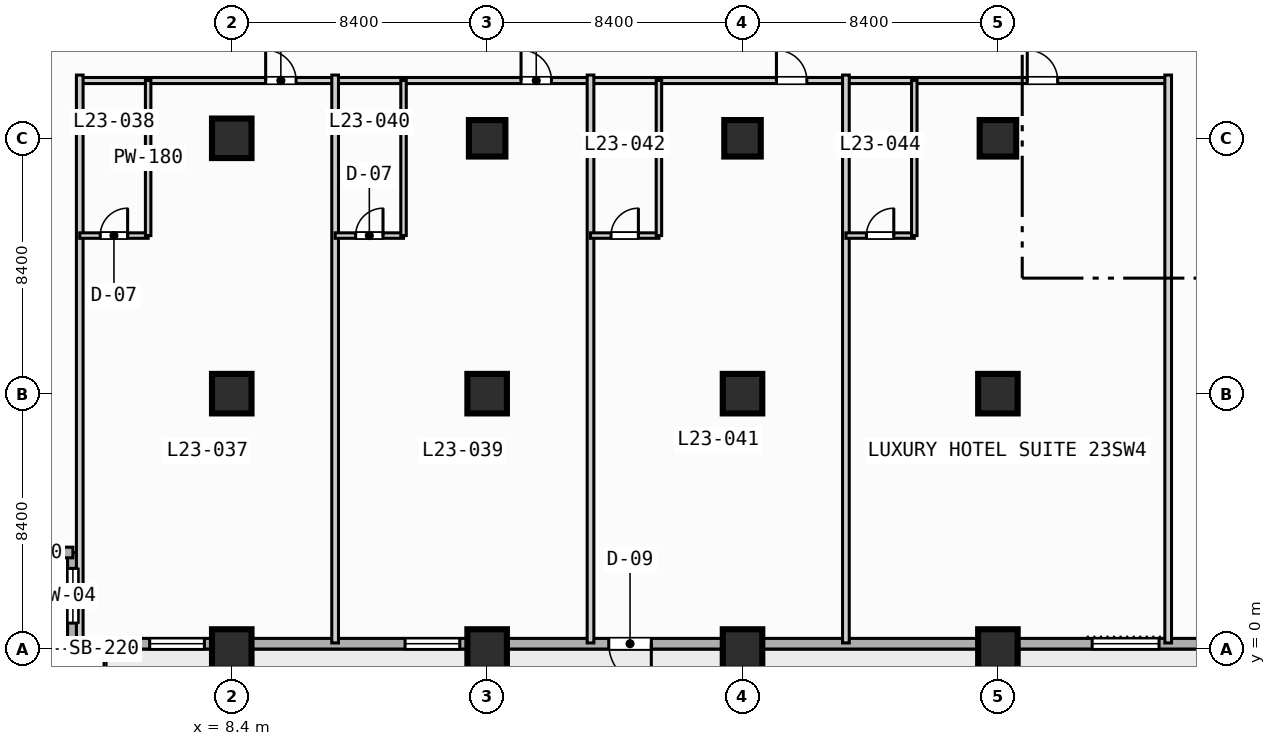
"""IFC4 building model, lengths in metres.
Left out: names, types, materials, properties, quantities, classifications, styles, units other than length and angle.
Written with IfcOpenShell. Run it as: python <this file> out.ifc"""

import sys

from ifc_helpers import new_model, si_unit, direction, frame, frame_2d, origin, origin_2d, place, context, subcontext, project, spatial, rectangle, extrude, element, fill, save


model = new_model("IFC4")
c1 = context("Model", 3, precision=1e-05, world=origin(), true_north=direction((0.0, 1.0)))
c2 = subcontext(c1, "Body", "Model", "MODEL_VIEW")
j1 = project(units=[si_unit("LENGTHUNIT", "METRE"), si_unit("PLANEANGLEUNIT", "RADIAN")], contexts=[c1])
p1 = place(None, origin())
s1 = spatial("IfcSite", under=j1, at=p1, CompositionType="ELEMENT")
p2 = place(p1, origin())
s2 = spatial("IfcBuilding", under=s1, at=p2, CompositionType="ELEMENT")
p3 = place(p2, frame((0.0, 0.0, 100.0)))
s3 = spatial("IfcBuildingStorey", under=s2, at=p3, CompositionType="ELEMENT", Elevation=100.0)
for number, where, z_axis, x_axis in (
    (1, (8.4, 0.0, 0.0), (0.0, 0.0, 1.0), (1.0, 0.0, 0.0)),
    (2, (8.4, 8.4, 0.0), (0.0, 0.0, 1.0), (1.0, 0.0, 0.0)),
    (3, (8.4, 16.8, 0.0), (0.0, 0.0, 1.0), (1.0, 0.0, 0.0)),
    (4, (16.8, 0.0, 0.0), (0.0, 0.0, 1.0), (1.0, 0.0, 0.0)),
    (5, (16.8, 8.4, 0.0), (0.0, 0.0, 1.0), (1.0, 0.0, 0.0)),
):
    element("IfcColumn", number, at=place(p3, frame(where, z_axis=z_axis, x_axis=x_axis)), inside=s3, PredefinedType="COLUMN", context=c2, shape_type="SweptSolid", body=[
        extrude(rectangle(XDim=1.3, YDim=1.3, at=origin_2d()), origin(), (0.0, 0.0, 1.0), 3.8),
    ])
p4 = place(p3, frame((16.8, 16.8, 0.0), z_axis=(0.0, 0.0, 1.0), x_axis=(1.0, 0.0, 0.0)))
e6 = element("IfcColumn", 6, at=p4, inside=s3, PredefinedType="COLUMN", context=c2, shape_type="SweptSolid", body=[
    extrude(rectangle(XDim=1.2, YDim=1.2, at=origin_2d()), origin(), (0.0, 0.0, 1.0), 3.8),
])
for number, where, z_axis, x_axis in (
    (7, (25.2, 0.0, 0.0), (0.0, 0.0, 1.0), (1.0, 0.0, 0.0)),
    (8, (25.2, 8.4, 0.0), (0.0, 0.0, 1.0), (1.0, 0.0, 0.0)),
):
    element("IfcColumn", number, at=place(p3, frame(where, z_axis=z_axis, x_axis=x_axis)), inside=s3, PredefinedType="COLUMN", context=c2, shape_type="SweptSolid", body=[
        extrude(rectangle(XDim=1.3, YDim=1.3, at=origin_2d()), origin(), (0.0, 0.0, 1.0), 3.8),
    ])
p5 = place(p3, frame((25.2, 16.8, 0.0), z_axis=(0.0, 0.0, 1.0), x_axis=(1.0, 0.0, 0.0)))
e9 = element("IfcColumn", 9, at=p5, inside=s3, PredefinedType="COLUMN", context=c2, shape_type="SweptSolid", body=[
    extrude(rectangle(XDim=1.2, YDim=1.2, at=origin_2d()), origin(), (0.0, 0.0, 1.0), 3.8),
])
for number, where, z_axis, x_axis in (
    (10, (33.6, 0.0, 0.0), (0.0, 0.0, 1.0), (1.0, 0.0, 0.0)),
    (11, (33.6, 8.4, 0.0), (0.0, 0.0, 1.0), (1.0, 0.0, 0.0)),
):
    element("IfcColumn", number, at=place(p3, frame(where, z_axis=z_axis, x_axis=x_axis)), inside=s3, PredefinedType="COLUMN", context=c2, shape_type="SweptSolid", body=[
        extrude(rectangle(XDim=1.3, YDim=1.3, at=origin_2d()), origin(), (0.0, 0.0, 1.0), 3.8),
    ])
p6 = place(p3, frame((33.6, 16.8, 0.0), z_axis=(0.0, 0.0, 1.0), x_axis=(1.0, 0.0, 0.0)))
e12 = element("IfcColumn", 12, at=p6, inside=s3, PredefinedType="COLUMN", context=c2, shape_type="SweptSolid", body=[
    extrude(rectangle(XDim=1.2, YDim=1.2, at=origin_2d()), origin(), (0.0, 0.0, 1.0), 3.8),
])
p7 = place(p3, frame((3.175, 0.175, 0.0), z_axis=(0.0, 0.0, 1.0), x_axis=(0.0, 1.0, 0.0)))
e13 = element("IfcWall", 13, at=p7, inside=s3, PredefinedType="STANDARD", context=c2, shape_type="SweptSolid", body=[
    extrude(rectangle(XDim=3.0, YDim=0.35, at=frame_2d((1.5, 0.0))), origin(), (0.0, 0.0, 1.0), 3.55),
])
p8 = place(p7, frame((0.677, 0.0, 0.85)))
e14 = element("IfcOpeningElement", 14, at=p8, cuts=e13, PredefinedType="OPENING", context=c2, shape_type="SweptSolid", body=[
    extrude(rectangle(XDim=1.8, YDim=1.8, at=frame_2d((0.9, 0.9))), frame((0.0, 0.185, 0.0), z_axis=(0.0, -1.0, 0.0), x_axis=(1.0, 0.0, 0.0)), (0.0, 0.0, 1.0), 0.37),
])
p9 = place(p3, frame((3.175, 3.175, 0.0), z_axis=(0.0, 0.0, 1.0), x_axis=(-1.0, 0.0, 0.0)))
e15 = element("IfcWall", 15, at=p9, inside=s3, PredefinedType="STANDARD", context=c2, shape_type="SweptSolid", body=[
    extrude(rectangle(XDim=3.0, YDim=0.35, at=frame_2d((1.5, 0.0))), origin(), (0.0, 0.0, 1.0), 3.55),
])
p10 = place(p3, frame((72.425, 0.175, 0.0), z_axis=(0.0, 0.0, 1.0), x_axis=(-1.0, 0.0, 0.0)))
e16 = element("IfcWall", 16, at=p10, inside=s3, PredefinedType="STANDARD", context=c2, shape_type="SweptSolid", body=[
    extrude(rectangle(XDim=69.25, YDim=0.35, at=frame_2d((34.625, 0.0))), origin(), (0.0, 0.0, 1.0), 3.55),
])
p11 = place(p10, frame((50.225, 0.0, 0.0)))
e17 = element("IfcOpeningElement", 17, at=p11, cuts=e16, PredefinedType="OPENING", context=c2, shape_type="SweptSolid", body=[
    extrude(rectangle(XDim=1.4, YDim=2.2, at=frame_2d((0.7, 1.1))), frame((0.0, 0.185, 0.0), z_axis=(0.0, -1.0, 0.0), x_axis=(1.0, 0.0, 0.0)), (0.0, 0.0, 1.0), 0.37),
])
p12 = place(p10, frame((33.525, 0.0, 0.85)))
e18 = element("IfcOpeningElement", 18, at=p12, cuts=e16, PredefinedType="OPENING", context=c2, shape_type="SweptSolid", body=[
    extrude(rectangle(XDim=2.2, YDim=1.8, at=frame_2d((1.1, 0.9))), frame((0.0, 0.185, 0.0), z_axis=(0.0, -1.0, 0.0), x_axis=(1.0, 0.0, 0.0)), (0.0, 0.0, 1.0), 0.37),
])
p13 = place(p10, frame((25.125, 0.0, 0.85)))
e19 = element("IfcOpeningElement", 19, at=p13, cuts=e16, PredefinedType="OPENING", context=c2, shape_type="SweptSolid", body=[
    extrude(rectangle(XDim=2.2, YDim=1.8, at=frame_2d((1.1, 0.9))), frame((0.0, 0.185, 0.0), z_axis=(0.0, -1.0, 0.0), x_axis=(1.0, 0.0, 0.0)), (0.0, 0.0, 1.0), 0.37),
])
p14 = place(p10, frame((8.325, 0.0, 0.85)))
e20 = element("IfcOpeningElement", 20, at=p14, cuts=e16, PredefinedType="OPENING", context=c2, shape_type="SweptSolid", body=[
    extrude(rectangle(XDim=2.2, YDim=1.8, at=frame_2d((1.1, 0.9))), frame((0.0, 0.185, 0.0), z_axis=(0.0, -1.0, 0.0), x_axis=(1.0, 0.0, 0.0)), (0.0, 0.0, 1.0), 0.37),
])
p15 = place(p10, frame((64.925, 0.0, 0.85)))
e21 = element("IfcOpeningElement", 21, at=p15, cuts=e16, PredefinedType="OPENING", context=c2, shape_type="SweptSolid", body=[
    extrude(rectangle(XDim=1.8, YDim=1.8, at=frame_2d((0.9, 0.9))), frame((0.0, 0.185, 0.0), z_axis=(0.0, -1.0, 0.0), x_axis=(1.0, 0.0, 0.0)), (0.0, 0.0, 1.0), 0.37),
])
p16 = place(p10, frame((56.525, 0.0, 0.85)))
e22 = element("IfcOpeningElement", 22, at=p16, cuts=e16, PredefinedType="OPENING", context=c2, shape_type="SweptSolid", body=[
    extrude(rectangle(XDim=1.8, YDim=1.8, at=frame_2d((0.9, 0.9))), frame((0.0, 0.185, 0.0), z_axis=(0.0, -1.0, 0.0), x_axis=(1.0, 0.0, 0.0)), (0.0, 0.0, 1.0), 0.37),
])
p17 = place(p10, frame((2.125, 0.0, 0.85)))
e23 = element("IfcOpeningElement", 23, at=p17, cuts=e16, PredefinedType="OPENING", context=c2, shape_type="SweptSolid", body=[
    extrude(rectangle(XDim=1.8, YDim=1.8, at=frame_2d((0.9, 0.9))), frame((0.0, 0.185, 0.0), z_axis=(0.0, -1.0, 0.0), x_axis=(1.0, 0.0, 0.0)), (0.0, 0.0, 1.0), 0.37),
])
p18 = place(p3, frame((3.4, 18.7, 0.0), z_axis=(0.0, 0.0, 1.0), x_axis=(1.0, 0.0, 0.0)))
e24 = element("IfcWall", 24, at=p18, inside=s3, PredefinedType="PARTITIONING", context=c2, shape_type="SweptSolid", body=[
    extrude(rectangle(XDim=35.8, YDim=0.2, at=frame_2d((17.9, 0.0))), origin(), (0.0, 0.0, 1.0), 3.55),
])
p19 = place(p18, frame((6.115, 0.0, 0.0)))
e25 = element("IfcOpeningElement", 25, at=p19, cuts=e24, PredefinedType="OPENING", context=c2, shape_type="SweptSolid", body=[
    extrude(rectangle(XDim=1.0, YDim=2.15, at=frame_2d((0.5, 1.075))), frame((0.0, 0.11, 0.0), z_axis=(0.0, -1.0, 0.0), x_axis=(1.0, 0.0, 0.0)), (0.0, 0.0, 1.0), 0.22),
])
p20 = place(p18, frame((14.515, 0.0, 0.0)))
e26 = element("IfcOpeningElement", 26, at=p20, cuts=e24, PredefinedType="OPENING", context=c2, shape_type="SweptSolid", body=[
    extrude(rectangle(XDim=1.0, YDim=2.15, at=frame_2d((0.5, 1.075))), frame((0.0, 0.11, 0.0), z_axis=(0.0, -1.0, 0.0), x_axis=(1.0, 0.0, 0.0)), (0.0, 0.0, 1.0), 0.22),
])
p21 = place(p18, frame((22.915, 0.0, 0.0)))
e27 = element("IfcOpeningElement", 27, at=p21, cuts=e24, PredefinedType="OPENING", context=c2, shape_type="SweptSolid", body=[
    extrude(rectangle(XDim=1.0, YDim=2.15, at=frame_2d((0.5, 1.075))), frame((0.0, 0.11, 0.0), z_axis=(0.0, -1.0, 0.0), x_axis=(1.0, 0.0, 0.0)), (0.0, 0.0, 1.0), 0.22),
])
p22 = place(p18, frame((31.165, 0.0, 0.0)))
e28 = element("IfcOpeningElement", 28, at=p22, cuts=e24, PredefinedType="OPENING", context=c2, shape_type="SweptSolid", body=[
    extrude(rectangle(XDim=1.0, YDim=2.15, at=frame_2d((0.5, 1.075))), frame((0.0, 0.11, 0.0), z_axis=(0.0, -1.0, 0.0), x_axis=(1.0, 0.0, 0.0)), (0.0, 0.0, 1.0), 0.22),
])
p23 = place(p3, frame((3.4, 0.2, 0.0), z_axis=(0.0, 0.0, 1.0), x_axis=(0.0, 1.0, 0.0)))
e29 = element("IfcWall", 29, at=p23, inside=s3, PredefinedType="PARTITIONING", context=c2, shape_type="SweptSolid", body=[
    extrude(rectangle(XDim=18.68, YDim=0.22, at=frame_2d((9.34, 0.0))), origin(), (0.0, 0.0, 1.0), 3.55),
])
p24 = place(p3, frame((3.4, 13.6, 0.0), z_axis=(0.0, 0.0, 1.0), x_axis=(1.0, 0.0, 0.0)))
e30 = element("IfcWall", 30, at=p24, inside=s3, PredefinedType="PLUMBINGWALL", context=c2, shape_type="SweptSolid", body=[
    extrude(rectangle(XDim=2.25, YDim=0.18, at=frame_2d((1.125, 0.0))), origin(), (0.0, 0.0, 1.0), 3.55),
])
p25 = place(p24, frame((0.675, 0.0, 0.0)))
e31 = element("IfcOpeningElement", 31, at=p25, cuts=e30, PredefinedType="OPENING", context=c2, shape_type="SweptSolid", body=[
    extrude(rectangle(XDim=0.9, YDim=2.1, at=frame_2d((0.45, 1.05))), frame((0.0, 0.1, 0.0), z_axis=(0.0, -1.0, 0.0), x_axis=(1.0, 0.0, 0.0)), (0.0, 0.0, 1.0), 0.2),
])
p26 = place(p3, frame((5.65, 13.6, 0.0), z_axis=(0.0, 0.0, 1.0), x_axis=(0.0, 1.0, 0.0)))
e32 = element("IfcWall", 32, at=p26, inside=s3, PredefinedType="PLUMBINGWALL", context=c2, shape_type="SweptSolid", body=[
    extrude(rectangle(XDim=5.1, YDim=0.18, at=frame_2d((2.55, 0.0))), origin(), (0.0, 0.0, 1.0), 3.55),
])
p27 = place(p3, frame((11.8, 0.2, 0.0), z_axis=(0.0, 0.0, 1.0), x_axis=(0.0, 1.0, 0.0)))
e33 = element("IfcWall", 33, at=p27, inside=s3, PredefinedType="PARTITIONING", context=c2, shape_type="SweptSolid", body=[
    extrude(rectangle(XDim=18.68, YDim=0.22, at=frame_2d((9.34, 0.0))), origin(), (0.0, 0.0, 1.0), 3.55),
])
p28 = place(p3, frame((11.8, 13.6, 0.0), z_axis=(0.0, 0.0, 1.0), x_axis=(1.0, 0.0, 0.0)))
e34 = element("IfcWall", 34, at=p28, inside=s3, PredefinedType="PLUMBINGWALL", context=c2, shape_type="SweptSolid", body=[
    extrude(rectangle(XDim=2.25, YDim=0.18, at=frame_2d((1.125, 0.0))), origin(), (0.0, 0.0, 1.0), 3.55),
])
p29 = place(p28, frame((0.675, 0.0, 0.0)))
e35 = element("IfcOpeningElement", 35, at=p29, cuts=e34, PredefinedType="OPENING", context=c2, shape_type="SweptSolid", body=[
    extrude(rectangle(XDim=0.9, YDim=2.1, at=frame_2d((0.45, 1.05))), frame((0.0, 0.1, 0.0), z_axis=(0.0, -1.0, 0.0), x_axis=(1.0, 0.0, 0.0)), (0.0, 0.0, 1.0), 0.2),
])
p30 = place(p3, frame((14.05, 13.6, 0.0), z_axis=(0.0, 0.0, 1.0), x_axis=(0.0, 1.0, 0.0)))
e36 = element("IfcWall", 36, at=p30, inside=s3, PredefinedType="PLUMBINGWALL", context=c2, shape_type="SweptSolid", body=[
    extrude(rectangle(XDim=5.1, YDim=0.18, at=frame_2d((2.55, 0.0))), origin(), (0.0, 0.0, 1.0), 3.55),
])
p31 = place(p3, frame((20.2, 0.2, 0.0), z_axis=(0.0, 0.0, 1.0), x_axis=(0.0, 1.0, 0.0)))
e37 = element("IfcWall", 37, at=p31, inside=s3, PredefinedType="PARTITIONING", context=c2, shape_type="SweptSolid", body=[
    extrude(rectangle(XDim=18.68, YDim=0.22, at=frame_2d((9.34, 0.0))), origin(), (0.0, 0.0, 1.0), 3.55),
])
p32 = place(p3, frame((20.2, 13.6, 0.0), z_axis=(0.0, 0.0, 1.0), x_axis=(1.0, 0.0, 0.0)))
e38 = element("IfcWall", 38, at=p32, inside=s3, PredefinedType="PLUMBINGWALL", context=c2, shape_type="SweptSolid", body=[
    extrude(rectangle(XDim=2.25, YDim=0.18, at=frame_2d((1.125, 0.0))), origin(), (0.0, 0.0, 1.0), 3.55),
])
p33 = place(p32, frame((0.675, 0.0, 0.0)))
e39 = element("IfcOpeningElement", 39, at=p33, cuts=e38, PredefinedType="OPENING", context=c2, shape_type="SweptSolid", body=[
    extrude(rectangle(XDim=0.9, YDim=2.1, at=frame_2d((0.45, 1.05))), frame((0.0, 0.1, 0.0), z_axis=(0.0, -1.0, 0.0), x_axis=(1.0, 0.0, 0.0)), (0.0, 0.0, 1.0), 0.2),
])
p34 = place(p3, frame((22.45, 13.6, 0.0), z_axis=(0.0, 0.0, 1.0), x_axis=(0.0, 1.0, 0.0)))
e40 = element("IfcWall", 40, at=p34, inside=s3, PredefinedType="PLUMBINGWALL", context=c2, shape_type="SweptSolid", body=[
    extrude(rectangle(XDim=5.1, YDim=0.18, at=frame_2d((2.55, 0.0))), origin(), (0.0, 0.0, 1.0), 3.55),
])
for number, where, z_axis, x_axis in (
    (41, (28.6, 0.2, 0.0), (0.0, 0.0, 1.0), (0.0, 1.0, 0.0)),
    (42, (39.2, 0.2, 0.0), (0.0, 0.0, 1.0), (0.0, 1.0, 0.0)),
):
    element("IfcWall", number, at=place(p3, frame(where, z_axis=z_axis, x_axis=x_axis)), inside=s3, PredefinedType="PARTITIONING", context=c2, shape_type="SweptSolid", body=[
        extrude(rectangle(XDim=18.68, YDim=0.22, at=frame_2d((9.34, 0.0))), origin(), (0.0, 0.0, 1.0), 3.55),
    ])
p35 = place(p3, frame((28.6, 13.6, 0.0), z_axis=(0.0, 0.0, 1.0), x_axis=(1.0, 0.0, 0.0)))
e43 = element("IfcWall", 43, at=p35, inside=s3, PredefinedType="PLUMBINGWALL", context=c2, shape_type="SweptSolid", body=[
    extrude(rectangle(XDim=2.25, YDim=0.18, at=frame_2d((1.125, 0.0))), origin(), (0.0, 0.0, 1.0), 3.55),
])
p36 = place(p35, frame((0.675, 0.0, 0.0)))
e44 = element("IfcOpeningElement", 44, at=p36, cuts=e43, PredefinedType="OPENING", context=c2, shape_type="SweptSolid", body=[
    extrude(rectangle(XDim=0.9, YDim=2.1, at=frame_2d((0.45, 1.05))), frame((0.0, 0.1, 0.0), z_axis=(0.0, -1.0, 0.0), x_axis=(1.0, 0.0, 0.0)), (0.0, 0.0, 1.0), 0.2),
])
p37 = place(p3, frame((30.85, 13.6, 0.0), z_axis=(0.0, 0.0, 1.0), x_axis=(0.0, 1.0, 0.0)))
e45 = element("IfcWall", 45, at=p37, inside=s3, PredefinedType="PLUMBINGWALL", context=c2, shape_type="SweptSolid", body=[
    extrude(rectangle(XDim=5.1, YDim=0.18, at=frame_2d((2.55, 0.0))), origin(), (0.0, 0.0, 1.0), 3.55),
])
p38 = place(p8, origin())
e46 = element("IfcWindow", 46, at=p38, inside=s3, PartitioningType="SINGLE_PANEL", PredefinedType="WINDOW", context=c2, shape_type="SweptSolid", body=[
    extrude(rectangle(XDim=1.8, YDim=1.8, at=frame_2d((0.9, 0.9))), frame((0.0, 0.03, 0.0), z_axis=(0.0, -1.0, 0.0), x_axis=(1.0, 0.0, 0.0)), (0.0, 0.0, 1.0), 0.06),
])
fill(e14, e46)
p39 = place(p11, origin())
e47 = element("IfcDoor", 47, at=p39, inside=s3, OperationType="SINGLE_SWING_LEFT", PredefinedType="DOOR", context=c2, shape_type="SweptSolid", body=[
    extrude(rectangle(XDim=1.4, YDim=2.2, at=frame_2d((0.7, 1.1))), frame((0.0, 0.025, 0.0), z_axis=(0.0, -1.0, 0.0), x_axis=(1.0, 0.0, 0.0)), (0.0, 0.0, 1.0), 0.05),
])
fill(e17, e47)
p40 = place(p12, origin())
e48 = element("IfcWindow", 48, at=p40, inside=s3, PartitioningType="SINGLE_PANEL", PredefinedType="WINDOW", context=c2, shape_type="SweptSolid", body=[
    extrude(rectangle(XDim=2.2, YDim=1.8, at=frame_2d((1.1, 0.9))), frame((0.0, 0.03, 0.0), z_axis=(0.0, -1.0, 0.0), x_axis=(1.0, 0.0, 0.0)), (0.0, 0.0, 1.0), 0.06),
])
fill(e18, e48)
p41 = place(p15, origin())
e49 = element("IfcWindow", 49, at=p41, inside=s3, PartitioningType="SINGLE_PANEL", PredefinedType="WINDOW", context=c2, shape_type="SweptSolid", body=[
    extrude(rectangle(XDim=1.8, YDim=1.8, at=frame_2d((0.9, 0.9))), frame((0.0, 0.03, 0.0), z_axis=(0.0, -1.0, 0.0), x_axis=(1.0, 0.0, 0.0)), (0.0, 0.0, 1.0), 0.06),
])
fill(e21, e49)
p42 = place(p16, origin())
e50 = element("IfcWindow", 50, at=p42, inside=s3, PartitioningType="SINGLE_PANEL", PredefinedType="WINDOW", context=c2, shape_type="SweptSolid", body=[
    extrude(rectangle(XDim=1.8, YDim=1.8, at=frame_2d((0.9, 0.9))), frame((0.0, 0.03, 0.0), z_axis=(0.0, -1.0, 0.0), x_axis=(1.0, 0.0, 0.0)), (0.0, 0.0, 1.0), 0.06),
])
fill(e22, e50)
p43 = place(p19, origin())
e51 = element("IfcDoor", 51, at=p43, inside=s3, OperationType="SINGLE_SWING_LEFT", PredefinedType="DOOR", context=c2, shape_type="SweptSolid", body=[
    extrude(rectangle(XDim=1.0, YDim=2.15, at=frame_2d((0.5, 1.075))), frame((0.0, 0.025, 0.0), z_axis=(0.0, -1.0, 0.0), x_axis=(1.0, 0.0, 0.0)), (0.0, 0.0, 1.0), 0.05),
])
fill(e25, e51)
p44 = place(p20, origin())
e52 = element("IfcDoor", 52, at=p44, inside=s3, OperationType="SINGLE_SWING_LEFT", PredefinedType="DOOR", context=c2, shape_type="SweptSolid", body=[
    extrude(rectangle(XDim=1.0, YDim=2.15, at=frame_2d((0.5, 1.075))), frame((0.0, 0.025, 0.0), z_axis=(0.0, -1.0, 0.0), x_axis=(1.0, 0.0, 0.0)), (0.0, 0.0, 1.0), 0.05),
])
fill(e26, e52)
p45 = place(p21, origin())
e53 = element("IfcDoor", 53, at=p45, inside=s3, OperationType="SINGLE_SWING_LEFT", PredefinedType="DOOR", context=c2, shape_type="SweptSolid", body=[
    extrude(rectangle(XDim=1.0, YDim=2.15, at=frame_2d((0.5, 1.075))), frame((0.0, 0.025, 0.0), z_axis=(0.0, -1.0, 0.0), x_axis=(1.0, 0.0, 0.0)), (0.0, 0.0, 1.0), 0.05),
])
fill(e27, e53)
p46 = place(p22, origin())
e54 = element("IfcDoor", 54, at=p46, inside=s3, OperationType="SINGLE_SWING_LEFT", PredefinedType="DOOR", context=c2, shape_type="SweptSolid", body=[
    extrude(rectangle(XDim=1.0, YDim=2.15, at=frame_2d((0.5, 1.075))), frame((0.0, 0.025, 0.0), z_axis=(0.0, -1.0, 0.0), x_axis=(1.0, 0.0, 0.0)), (0.0, 0.0, 1.0), 0.05),
])
fill(e28, e54)
p47 = place(p25, origin())
e55 = element("IfcDoor", 55, at=p47, inside=s3, OperationType="SINGLE_SWING_RIGHT", PredefinedType="DOOR", context=c2, shape_type="SweptSolid", body=[
    extrude(rectangle(XDim=0.9, YDim=2.1, at=frame_2d((0.45, 1.05))), frame((0.0, 0.025, 0.0), z_axis=(0.0, -1.0, 0.0), x_axis=(1.0, 0.0, 0.0)), (0.0, 0.0, 1.0), 0.05),
])
fill(e31, e55)
p48 = place(p29, origin())
e56 = element("IfcDoor", 56, at=p48, inside=s3, OperationType="SINGLE_SWING_RIGHT", PredefinedType="DOOR", context=c2, shape_type="SweptSolid", body=[
    extrude(rectangle(XDim=0.9, YDim=2.1, at=frame_2d((0.45, 1.05))), frame((0.0, 0.025, 0.0), z_axis=(0.0, -1.0, 0.0), x_axis=(1.0, 0.0, 0.0)), (0.0, 0.0, 1.0), 0.05),
])
fill(e35, e56)
p49 = place(p33, origin())
e57 = element("IfcDoor", 57, at=p49, inside=s3, OperationType="SINGLE_SWING_RIGHT", PredefinedType="DOOR", context=c2, shape_type="SweptSolid", body=[
    extrude(rectangle(XDim=0.9, YDim=2.1, at=frame_2d((0.45, 1.05))), frame((0.0, 0.025, 0.0), z_axis=(0.0, -1.0, 0.0), x_axis=(1.0, 0.0, 0.0)), (0.0, 0.0, 1.0), 0.05),
])
fill(e39, e57)
p50 = place(p36, origin())
e58 = element("IfcDoor", 58, at=p50, inside=s3, OperationType="SINGLE_SWING_RIGHT", PredefinedType="DOOR", context=c2, shape_type="SweptSolid", body=[
    extrude(rectangle(XDim=0.9, YDim=2.1, at=frame_2d((0.45, 1.05))), frame((0.0, 0.025, 0.0), z_axis=(0.0, -1.0, 0.0), x_axis=(1.0, 0.0, 0.0)), (0.0, 0.0, 1.0), 0.05),
])
fill(e44, e58)
save(model, sys.argv[1])
